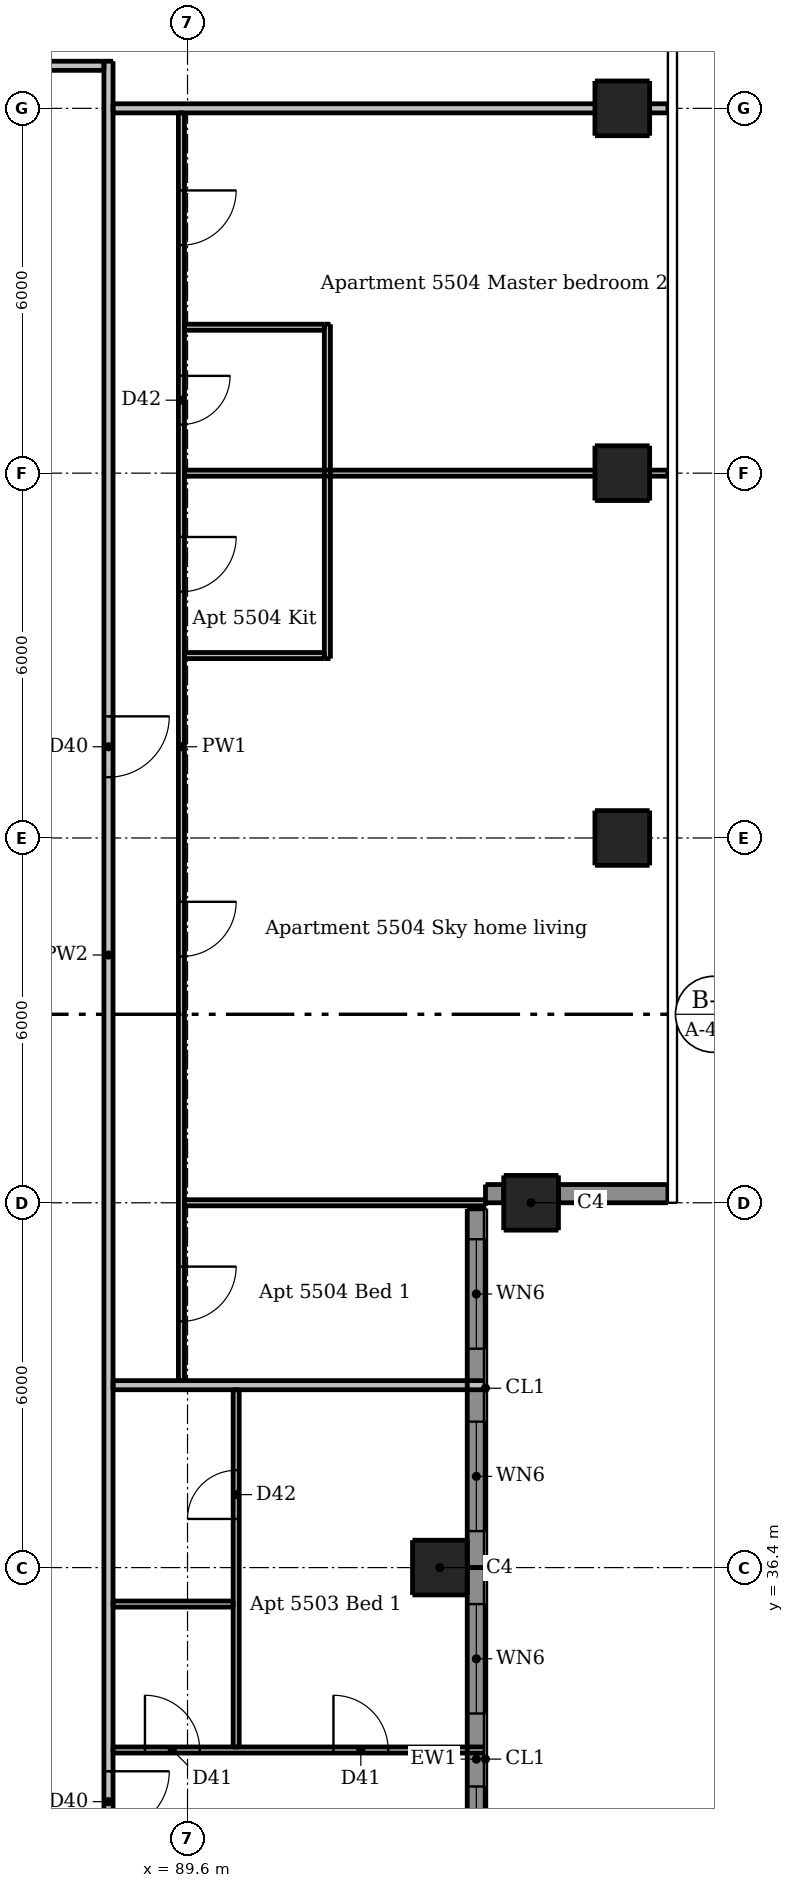
"""IFC4 building model, lengths in metres.
Left out: names, types, materials, properties, quantities, classifications, styles, units other than length and angle.
Written with IfcOpenShell. Run it as: python <this file> out.ifc"""

import sys

from ifc_helpers import new_model, si_unit, direction, frame, frame_2d, origin, origin_2d, place, context, subcontext, project, spatial, rectangle, extrude, element, fill, save


model = new_model("IFC4")
c1 = context("Model", 3, precision=1e-05, world=origin(), true_north=direction((0.0, 1.0)))
c2 = subcontext(c1, "Body", "Model", "MODEL_VIEW")
j1 = project(units=[si_unit("LENGTHUNIT", "METRE"), si_unit("PLANEANGLEUNIT", "RADIAN")], contexts=[c1])
p1 = place(None, origin())
s1 = spatial("IfcSite", under=j1, at=p1, CompositionType="ELEMENT")
p2 = place(p1, origin())
s2 = spatial("IfcBuilding", under=s1, at=p2, CompositionType="ELEMENT")
p3 = place(p2, frame((0.0, 0.0, 206.8)))
s3 = spatial("IfcBuildingStorey", under=s2, at=p3, CompositionType="ELEMENT", Elevation=206.8)
for number, where, z_axis, x_axis in (
    (1, (93.75, 36.4, 0.0), (0.0, 0.0, 1.0), (1.0, 0.0, 0.0)),
    (2, (95.25, 42.4, 0.0), (0.0, 0.0, 1.0), (1.0, 0.0, 0.0)),
    (3, (96.75, 48.4, 0.0), (0.0, 0.0, 1.0), (1.0, 0.0, 0.0)),
    (4, (96.75, 54.4, 0.0), (0.0, 0.0, 1.0), (1.0, 0.0, 0.0)),
    (5, (96.75, 60.4, 0.0), (0.0, 0.0, 1.0), (1.0, 0.0, 0.0)),
):
    element("IfcColumn", number, at=place(p3, frame(where, z_axis=z_axis, x_axis=x_axis)), inside=s3, PredefinedType="COLUMN", context=c2, shape_type="SweptSolid", body=[
        extrude(rectangle(XDim=0.9, YDim=0.9, at=origin_2d()), origin(), (0.0, 0.0, 1.0), 3.05),
    ])
p4 = place(p3, frame((94.5, 42.55, 0.0), z_axis=(0.0, 0.0, 1.0), x_axis=(1.0, 0.0, 0.0)))
e6 = element("IfcWall", 6, at=p4, inside=s3, PredefinedType="SOLIDWALL", context=c2, shape_type="SweptSolid", body=[
    extrude(rectangle(XDim=0.3, YDim=0.3, at=frame_2d((0.15, 0.0))), origin(), (0.0, 0.0, 1.0), 3.05),
])
p5 = place(p3, frame((95.7, 42.55, 0.0), z_axis=(0.0, 0.0, 1.0), x_axis=(1.0, 0.0, 0.0)))
e7 = element("IfcWall", 7, at=p5, inside=s3, PredefinedType="SOLIDWALL", context=c2, shape_type="SweptSolid", body=[
    extrude(rectangle(XDim=1.8, YDim=0.3, at=frame_2d((0.9, 0.0))), origin(), (0.0, 0.0, 1.0), 3.05),
])
p6 = place(p3, frame((94.35, 30.1, 0.0), z_axis=(0.0, 0.0, 1.0), x_axis=(0.0, 1.0, 0.0)))
e8 = element("IfcWall", 8, at=p6, inside=s3, PredefinedType="SOLIDWALL", context=c2, shape_type="SweptSolid", body=[
    extrude(rectangle(XDim=6.3, YDim=0.3, at=frame_2d((3.15, 0.0))), origin(), (0.0, 0.0, 1.0), 3.05),
])
p7 = place(p6, frame((0.9, 0.0, 0.15)))
e9 = element("IfcOpeningElement", 9, at=p7, cuts=e8, PredefinedType="OPENING", context=c2, shape_type="SweptSolid", body=[
    extrude(rectangle(XDim=1.8, YDim=2.1, at=frame_2d((0.9, 1.05))), frame((0.0, 0.16, 0.0), z_axis=(0.0, -1.0, 0.0), x_axis=(1.0, 0.0, 0.0)), (0.0, 0.0, 1.0), 0.32),
])
p8 = place(p6, frame((3.9, 0.0, 0.15)))
e10 = element("IfcOpeningElement", 10, at=p8, cuts=e8, PredefinedType="OPENING", context=c2, shape_type="SweptSolid", body=[
    extrude(rectangle(XDim=1.8, YDim=2.1, at=frame_2d((0.9, 1.05))), frame((0.0, 0.16, 0.0), z_axis=(0.0, -1.0, 0.0), x_axis=(1.0, 0.0, 0.0)), (0.0, 0.0, 1.0), 0.32),
])
p9 = place(p3, frame((94.35, 36.4, 0.0), z_axis=(0.0, 0.0, 1.0), x_axis=(0.0, 1.0, 0.0)))
e11 = element("IfcWall", 11, at=p9, inside=s3, PredefinedType="SOLIDWALL", context=c2, shape_type="SweptSolid", body=[
    extrude(rectangle(XDim=5.9, YDim=0.3, at=frame_2d((2.95, 0.0))), origin(), (0.0, 0.0, 1.0), 3.05),
])
p10 = place(p9, frame((0.6, 0.0, 0.15)))
e12 = element("IfcOpeningElement", 12, at=p10, cuts=e11, PredefinedType="OPENING", context=c2, shape_type="SweptSolid", body=[
    extrude(rectangle(XDim=1.8, YDim=2.1, at=frame_2d((0.9, 1.05))), frame((0.0, 0.16, 0.0), z_axis=(0.0, -1.0, 0.0), x_axis=(1.0, 0.0, 0.0)), (0.0, 0.0, 1.0), 0.32),
])
p11 = place(p9, frame((3.6, 0.0, 0.15)))
e13 = element("IfcOpeningElement", 13, at=p11, cuts=e11, PredefinedType="OPENING", context=c2, shape_type="SweptSolid", body=[
    extrude(rectangle(XDim=1.8, YDim=2.1, at=frame_2d((0.9, 1.05))), frame((0.0, 0.16, 0.0), z_axis=(0.0, -1.0, 0.0), x_axis=(1.0, 0.0, 0.0)), (0.0, 0.0, 1.0), 0.32),
])
p12 = place(p3, frame((89.5, 60.325, 0.0), z_axis=(0.0, 0.0, 1.0), x_axis=(0.0, -1.0, 0.0)))
e14 = element("IfcWall", 14, at=p12, inside=s3, PredefinedType="PARTITIONING", context=c2, shape_type="SweptSolid", body=[
    extrude(rectangle(XDim=20.85, YDim=0.1, at=frame_2d((10.425, 0.0))), origin(), (0.0, 0.0, 1.0), 2.51),
])
p13 = place(p12, frame((12.975, 0.0, 0.0)))
e15 = element("IfcOpeningElement", 15, at=p13, cuts=e14, PredefinedType="OPENING", context=c2, shape_type="SweptSolid", body=[
    extrude(rectangle(XDim=0.9, YDim=2.1, at=frame_2d((0.45, 1.05))), frame((0.0, 0.06, 0.0), z_axis=(0.0, -1.0, 0.0), x_axis=(1.0, 0.0, 0.0)), (0.0, 0.0, 1.0), 0.12),
])
p14 = place(p12, frame((6.975, 0.0, 0.0)))
e16 = element("IfcOpeningElement", 16, at=p14, cuts=e14, PredefinedType="OPENING", context=c2, shape_type="SweptSolid", body=[
    extrude(rectangle(XDim=0.9, YDim=2.1, at=frame_2d((0.45, 1.05))), frame((0.0, 0.06, 0.0), z_axis=(0.0, -1.0, 0.0), x_axis=(1.0, 0.0, 0.0)), (0.0, 0.0, 1.0), 0.12),
])
p15 = place(p12, frame((18.975, 0.0, 0.0)))
e17 = element("IfcOpeningElement", 17, at=p15, cuts=e14, PredefinedType="OPENING", context=c2, shape_type="SweptSolid", body=[
    extrude(rectangle(XDim=0.9, YDim=2.1, at=frame_2d((0.45, 1.05))), frame((0.0, 0.06, 0.0), z_axis=(0.0, -1.0, 0.0), x_axis=(1.0, 0.0, 0.0)), (0.0, 0.0, 1.0), 0.12),
])
p16 = place(p12, frame((1.275, 0.0, 0.0)))
e18 = element("IfcOpeningElement", 18, at=p16, cuts=e14, PredefinedType="OPENING", context=c2, shape_type="SweptSolid", body=[
    extrude(rectangle(XDim=0.9, YDim=2.1, at=frame_2d((0.45, 1.05))), frame((0.0, 0.06, 0.0), z_axis=(0.0, -1.0, 0.0), x_axis=(1.0, 0.0, 0.0)), (0.0, 0.0, 1.0), 0.12),
])
p17 = place(p12, frame((4.325, 0.0, 0.0)))
e19 = element("IfcOpeningElement", 19, at=p17, cuts=e14, PredefinedType="OPENING", context=c2, shape_type="SweptSolid", body=[
    extrude(rectangle(XDim=0.8, YDim=2.1, at=frame_2d((0.4, 1.05))), frame((0.0, 0.06, 0.0), z_axis=(0.0, -1.0, 0.0), x_axis=(1.0, 0.0, 0.0)), (0.0, 0.0, 1.0), 0.12),
])
p18 = place(p3, frame((90.4, 33.45, 0.0), z_axis=(0.0, 0.0, 1.0), x_axis=(0.0, 1.0, 0.0)))
e20 = element("IfcWall", 20, at=p18, inside=s3, PredefinedType="PARTITIONING", context=c2, shape_type="SweptSolid", body=[
    extrude(rectangle(XDim=5.875, YDim=0.1, at=frame_2d((2.938, 0.0))), origin(), (0.0, 0.0, 1.0), 3.05),
])
p19 = place(p18, frame((3.75, 0.0, 0.0)))
e21 = element("IfcOpeningElement", 21, at=p19, cuts=e20, PredefinedType="OPENING", context=c2, shape_type="SweptSolid", body=[
    extrude(rectangle(XDim=0.8, YDim=2.1, at=frame_2d((0.4, 1.05))), frame((0.0, 0.06, 0.0), z_axis=(0.0, -1.0, 0.0), x_axis=(1.0, 0.0, 0.0)), (0.0, 0.0, 1.0), 0.12),
])
p20 = place(p3, frame((91.9, 51.35, 0.0), z_axis=(0.0, 0.0, 1.0), x_axis=(0.0, 1.0, 0.0)))
e22 = element("IfcWall", 22, at=p20, inside=s3, PredefinedType="PARTITIONING", context=c2, shape_type="SweptSolid", body=[
    extrude(rectangle(XDim=5.5, YDim=0.1, at=frame_2d((2.75, 0.0))), origin(), (0.0, 0.0, 1.0), 3.05),
])
p21 = place(p3, frame((89.55, 56.8, 0.0), z_axis=(0.0, 0.0, 1.0), x_axis=(1.0, 0.0, 0.0)))
e23 = element("IfcWall", 23, at=p21, inside=s3, PredefinedType="PARTITIONING", context=c2, shape_type="SweptSolid", body=[
    extrude(rectangle(XDim=2.3, YDim=0.1, at=frame_2d((1.15, 0.0))), origin(), (0.0, 0.0, 1.0), 3.05),
])
p22 = place(p3, frame((89.55, 54.4, 0.0), z_axis=(0.0, 0.0, 1.0), x_axis=(1.0, 0.0, 0.0)))
e24 = element("IfcWall", 24, at=p22, inside=s3, PredefinedType="PARTITIONING", context=c2, shape_type="SweptSolid", body=[
    extrude(rectangle(XDim=7.95, YDim=0.1, at=frame_2d((3.975, 0.0))), origin(), (0.0, 0.0, 1.0), 2.516),
])
p23 = place(p3, frame((89.55, 51.4, 0.0), z_axis=(0.0, 0.0, 1.0), x_axis=(1.0, 0.0, 0.0)))
e25 = element("IfcWall", 25, at=p23, inside=s3, PredefinedType="PARTITIONING", context=c2, shape_type="SweptSolid", body=[
    extrude(rectangle(XDim=2.3, YDim=0.1, at=frame_2d((1.15, 0.0))), origin(), (0.0, 0.0, 1.0), 3.05),
])
p24 = place(p3, frame((89.55, 42.4, 0.0), z_axis=(0.0, 0.0, 1.0), x_axis=(1.0, 0.0, 0.0)))
e26 = element("IfcWall", 26, at=p24, inside=s3, PredefinedType="PARTITIONING", context=c2, shape_type="SweptSolid", body=[
    extrude(rectangle(XDim=4.95, YDim=0.1, at=frame_2d((2.475, 0.0))), origin(), (0.0, 0.0, 1.0), 2.59),
])
p25 = place(p3, frame((88.375, 35.8, 0.0), z_axis=(0.0, 0.0, 1.0), x_axis=(1.0, 0.0, 0.0)))
e27 = element("IfcWall", 27, at=p25, inside=s3, PredefinedType="PARTITIONING", context=c2, shape_type="SweptSolid", body=[
    extrude(rectangle(XDim=1.975, YDim=0.1, at=frame_2d((0.988, 0.0))), origin(), (0.0, 0.0, 1.0), 3.05),
])
p26 = place(p3, frame((88.375, 33.4, 0.0), z_axis=(0.0, 0.0, 1.0), x_axis=(1.0, 0.0, 0.0)))
e28 = element("IfcWall", 28, at=p26, inside=s3, PredefinedType="PARTITIONING", context=c2, shape_type="SweptSolid", body=[
    extrude(rectangle(XDim=6.125, YDim=0.1, at=frame_2d((3.062, 0.0))), origin(), (0.0, 0.0, 1.0), 3.05),
])
p27 = place(p26, frame((0.525, 0.0, 0.0)))
e29 = element("IfcOpeningElement", 29, at=p27, cuts=e28, PredefinedType="OPENING", context=c2, shape_type="SweptSolid", body=[
    extrude(rectangle(XDim=0.9, YDim=2.1, at=frame_2d((0.45, 1.05))), frame((0.0, 0.06, 0.0), z_axis=(0.0, -1.0, 0.0), x_axis=(1.0, 0.0, 0.0)), (0.0, 0.0, 1.0), 0.12),
])
p28 = place(p26, frame((3.625, 0.0, 0.0)))
e30 = element("IfcOpeningElement", 30, at=p28, cuts=e28, PredefinedType="OPENING", context=c2, shape_type="SweptSolid", body=[
    extrude(rectangle(XDim=0.9, YDim=2.1, at=frame_2d((0.45, 1.05))), frame((0.0, 0.06, 0.0), z_axis=(0.0, -1.0, 0.0), x_axis=(1.0, 0.0, 0.0)), (0.0, 0.0, 1.0), 0.12),
])
p29 = place(p3, frame((88.3, 61.175, 0.0), z_axis=(0.0, 0.0, 1.0), x_axis=(0.0, -1.0, 0.0)))
e31 = element("IfcWall", 31, at=p29, inside=s3, PredefinedType="PARTITIONING", context=c2, shape_type="SweptSolid", body=[
    extrude(rectangle(XDim=29.4, YDim=0.15, at=frame_2d((14.7, 0.0))), origin(), (0.0, 0.0, 1.0), 3.05),
])
p30 = place(p29, frame((28.125, 0.0, 0.0)))
e32 = element("IfcOpeningElement", 32, at=p30, cuts=e31, PredefinedType="OPENING", context=c2, shape_type="SweptSolid", body=[
    extrude(rectangle(XDim=1.0, YDim=2.1, at=frame_2d((0.5, 1.05))), frame((0.0, 0.085, 0.0), z_axis=(0.0, -1.0, 0.0), x_axis=(1.0, 0.0, 0.0)), (0.0, 0.0, 1.0), 0.17),
])
p31 = place(p29, frame((10.775, 0.0, 0.0)))
e33 = element("IfcOpeningElement", 33, at=p31, cuts=e31, PredefinedType="OPENING", context=c2, shape_type="SweptSolid", body=[
    extrude(rectangle(XDim=1.0, YDim=2.1, at=frame_2d((0.5, 1.05))), frame((0.0, 0.085, 0.0), z_axis=(0.0, -1.0, 0.0), x_axis=(1.0, 0.0, 0.0)), (0.0, 0.0, 1.0), 0.17),
])
p32 = place(p3, frame((58.975, 61.1, 0.0), z_axis=(0.0, 0.0, 1.0), x_axis=(1.0, 0.0, 0.0)))
e34 = element("IfcWall", 34, at=p32, inside=s3, PredefinedType="PARTITIONING", context=c2, shape_type="SweptSolid", body=[
    extrude(rectangle(XDim=29.25, YDim=0.15, at=frame_2d((14.625, 0.0))), origin(), (0.0, 0.0, 1.0), 3.05),
])
p33 = place(p32, frame((9.125, 0.0, 0.0)))
e35 = element("IfcOpeningElement", 35, at=p33, cuts=e34, PredefinedType="OPENING", context=c2, shape_type="SweptSolid", body=[
    extrude(rectangle(XDim=1.0, YDim=2.1, at=frame_2d((0.5, 1.05))), frame((0.0, 0.085, 0.0), z_axis=(0.0, -1.0, 0.0), x_axis=(1.0, 0.0, 0.0)), (0.0, 0.0, 1.0), 0.17),
])
p34 = place(p32, frame((26.475, 0.0, 0.0)))
e36 = element("IfcOpeningElement", 36, at=p34, cuts=e34, PredefinedType="OPENING", context=c2, shape_type="SweptSolid", body=[
    extrude(rectangle(XDim=1.0, YDim=2.1, at=frame_2d((0.5, 1.05))), frame((0.0, 0.085, 0.0), z_axis=(0.0, -1.0, 0.0), x_axis=(1.0, 0.0, 0.0)), (0.0, 0.0, 1.0), 0.17),
])
p35 = place(p3, frame((88.375, 60.4, 0.0), z_axis=(0.0, 0.0, 1.0), x_axis=(1.0, 0.0, 0.0)))
e37 = element("IfcWall", 37, at=p35, inside=s3, PredefinedType="PARTITIONING", context=c2, shape_type="SweptSolid", body=[
    extrude(rectangle(XDim=9.125, YDim=0.15, at=frame_2d((4.562, 0.0))), origin(), (0.0, 0.0, 1.0), 2.59),
])
p36 = place(p3, frame((88.375, 39.4, 0.0), z_axis=(0.0, 0.0, 1.0), x_axis=(1.0, 0.0, 0.0)))
e38 = element("IfcWall", 38, at=p36, inside=s3, PredefinedType="PARTITIONING", context=c2, shape_type="SweptSolid", body=[
    extrude(rectangle(XDim=6.125, YDim=0.15, at=frame_2d((3.062, 0.0))), origin(), (0.0, 0.0, 1.0), 3.05),
])
p37 = place(p7, origin())
e39 = element("IfcWindow", 39, at=p37, inside=s3, PartitioningType="DOUBLE_PANEL_VERTICAL", PredefinedType="WINDOW", context=c2, shape_type="SweptSolid", body=[
    extrude(rectangle(XDim=1.8, YDim=2.1, at=frame_2d((0.9, 1.05))), frame((0.0, 0.03, 0.0), z_axis=(0.0, -1.0, 0.0), x_axis=(1.0, 0.0, 0.0)), (0.0, 0.0, 1.0), 0.06),
])
fill(e9, e39)
p38 = place(p8, origin())
e40 = element("IfcWindow", 40, at=p38, inside=s3, PartitioningType="DOUBLE_PANEL_VERTICAL", PredefinedType="WINDOW", context=c2, shape_type="SweptSolid", body=[
    extrude(rectangle(XDim=1.8, YDim=2.1, at=frame_2d((0.9, 1.05))), frame((0.0, 0.03, 0.0), z_axis=(0.0, -1.0, 0.0), x_axis=(1.0, 0.0, 0.0)), (0.0, 0.0, 1.0), 0.06),
])
fill(e10, e40)
p39 = place(p10, origin())
e41 = element("IfcWindow", 41, at=p39, inside=s3, PartitioningType="DOUBLE_PANEL_VERTICAL", PredefinedType="WINDOW", context=c2, shape_type="SweptSolid", body=[
    extrude(rectangle(XDim=1.8, YDim=2.1, at=frame_2d((0.9, 1.05))), frame((0.0, 0.03, 0.0), z_axis=(0.0, -1.0, 0.0), x_axis=(1.0, 0.0, 0.0)), (0.0, 0.0, 1.0), 0.06),
])
fill(e12, e41)
p40 = place(p11, origin())
e42 = element("IfcWindow", 42, at=p40, inside=s3, PartitioningType="DOUBLE_PANEL_VERTICAL", PredefinedType="WINDOW", context=c2, shape_type="SweptSolid", body=[
    extrude(rectangle(XDim=1.8, YDim=2.1, at=frame_2d((0.9, 1.05))), frame((0.0, 0.03, 0.0), z_axis=(0.0, -1.0, 0.0), x_axis=(1.0, 0.0, 0.0)), (0.0, 0.0, 1.0), 0.06),
])
fill(e13, e42)
p41 = place(p30, origin())
e43 = element("IfcDoor", 43, at=p41, inside=s3, OperationType="SINGLE_SWING_LEFT", PredefinedType="DOOR", context=c2, shape_type="SweptSolid", body=[
    extrude(rectangle(XDim=1.0, YDim=2.1, at=frame_2d((0.5, 1.05))), frame((0.0, 0.025, 0.0), z_axis=(0.0, -1.0, 0.0), x_axis=(1.0, 0.0, 0.0)), (0.0, 0.0, 1.0), 0.05),
])
fill(e32, e43)
p42 = place(p27, origin())
e44 = element("IfcDoor", 44, at=p42, inside=s3, OperationType="SINGLE_SWING_LEFT", PredefinedType="DOOR", context=c2, shape_type="SweptSolid", body=[
    extrude(rectangle(XDim=0.9, YDim=2.1, at=frame_2d((0.45, 1.05))), frame((0.0, 0.025, 0.0), z_axis=(0.0, -1.0, 0.0), x_axis=(1.0, 0.0, 0.0)), (0.0, 0.0, 1.0), 0.05),
])
fill(e29, e44)
p43 = place(p28, origin())
e45 = element("IfcDoor", 45, at=p43, inside=s3, OperationType="SINGLE_SWING_LEFT", PredefinedType="DOOR", context=c2, shape_type="SweptSolid", body=[
    extrude(rectangle(XDim=0.9, YDim=2.1, at=frame_2d((0.45, 1.05))), frame((0.0, 0.025, 0.0), z_axis=(0.0, -1.0, 0.0), x_axis=(1.0, 0.0, 0.0)), (0.0, 0.0, 1.0), 0.05),
])
fill(e30, e45)
p44 = place(p19, origin())
e46 = element("IfcDoor", 46, at=p44, inside=s3, OperationType="SINGLE_SWING_LEFT", PredefinedType="DOOR", context=c2, shape_type="SweptSolid", body=[
    extrude(rectangle(XDim=0.8, YDim=2.1, at=frame_2d((0.4, 1.05))), frame((0.0, 0.025, 0.0), z_axis=(0.0, -1.0, 0.0), x_axis=(1.0, 0.0, 0.0)), (0.0, 0.0, 1.0), 0.05),
])
fill(e21, e46)
p45 = place(p31, origin())
e47 = element("IfcDoor", 47, at=p45, inside=s3, OperationType="SINGLE_SWING_LEFT", PredefinedType="DOOR", context=c2, shape_type="SweptSolid", body=[
    extrude(rectangle(XDim=1.0, YDim=2.1, at=frame_2d((0.5, 1.05))), frame((0.0, 0.025, 0.0), z_axis=(0.0, -1.0, 0.0), x_axis=(1.0, 0.0, 0.0)), (0.0, 0.0, 1.0), 0.05),
])
fill(e33, e47)
p46 = place(p13, origin())
e48 = element("IfcDoor", 48, at=p46, inside=s3, OperationType="SINGLE_SWING_LEFT", PredefinedType="DOOR", context=c2, shape_type="SweptSolid", body=[
    extrude(rectangle(XDim=0.9, YDim=2.1, at=frame_2d((0.45, 1.05))), frame((0.0, 0.025, 0.0), z_axis=(0.0, -1.0, 0.0), x_axis=(1.0, 0.0, 0.0)), (0.0, 0.0, 1.0), 0.05),
])
fill(e15, e48)
p47 = place(p14, origin())
e49 = element("IfcDoor", 49, at=p47, inside=s3, OperationType="SINGLE_SWING_LEFT", PredefinedType="DOOR", context=c2, shape_type="SweptSolid", body=[
    extrude(rectangle(XDim=0.9, YDim=2.1, at=frame_2d((0.45, 1.05))), frame((0.0, 0.025, 0.0), z_axis=(0.0, -1.0, 0.0), x_axis=(1.0, 0.0, 0.0)), (0.0, 0.0, 1.0), 0.05),
])
fill(e16, e49)
p48 = place(p15, origin())
e50 = element("IfcDoor", 50, at=p48, inside=s3, OperationType="SINGLE_SWING_LEFT", PredefinedType="DOOR", context=c2, shape_type="SweptSolid", body=[
    extrude(rectangle(XDim=0.9, YDim=2.1, at=frame_2d((0.45, 1.05))), frame((0.0, 0.025, 0.0), z_axis=(0.0, -1.0, 0.0), x_axis=(1.0, 0.0, 0.0)), (0.0, 0.0, 1.0), 0.05),
])
fill(e17, e50)
p49 = place(p16, origin())
e51 = element("IfcDoor", 51, at=p49, inside=s3, OperationType="SINGLE_SWING_LEFT", PredefinedType="DOOR", context=c2, shape_type="SweptSolid", body=[
    extrude(rectangle(XDim=0.9, YDim=2.1, at=frame_2d((0.45, 1.05))), frame((0.0, 0.025, 0.0), z_axis=(0.0, -1.0, 0.0), x_axis=(1.0, 0.0, 0.0)), (0.0, 0.0, 1.0), 0.05),
])
fill(e18, e51)
p50 = place(p17, origin())
e52 = element("IfcDoor", 52, at=p50, inside=s3, OperationType="SINGLE_SWING_LEFT", PredefinedType="DOOR", context=c2, shape_type="SweptSolid", body=[
    extrude(rectangle(XDim=0.8, YDim=2.1, at=frame_2d((0.4, 1.05))), frame((0.0, 0.025, 0.0), z_axis=(0.0, -1.0, 0.0), x_axis=(1.0, 0.0, 0.0)), (0.0, 0.0, 1.0), 0.05),
])
fill(e19, e52)
save(model, sys.argv[1])
